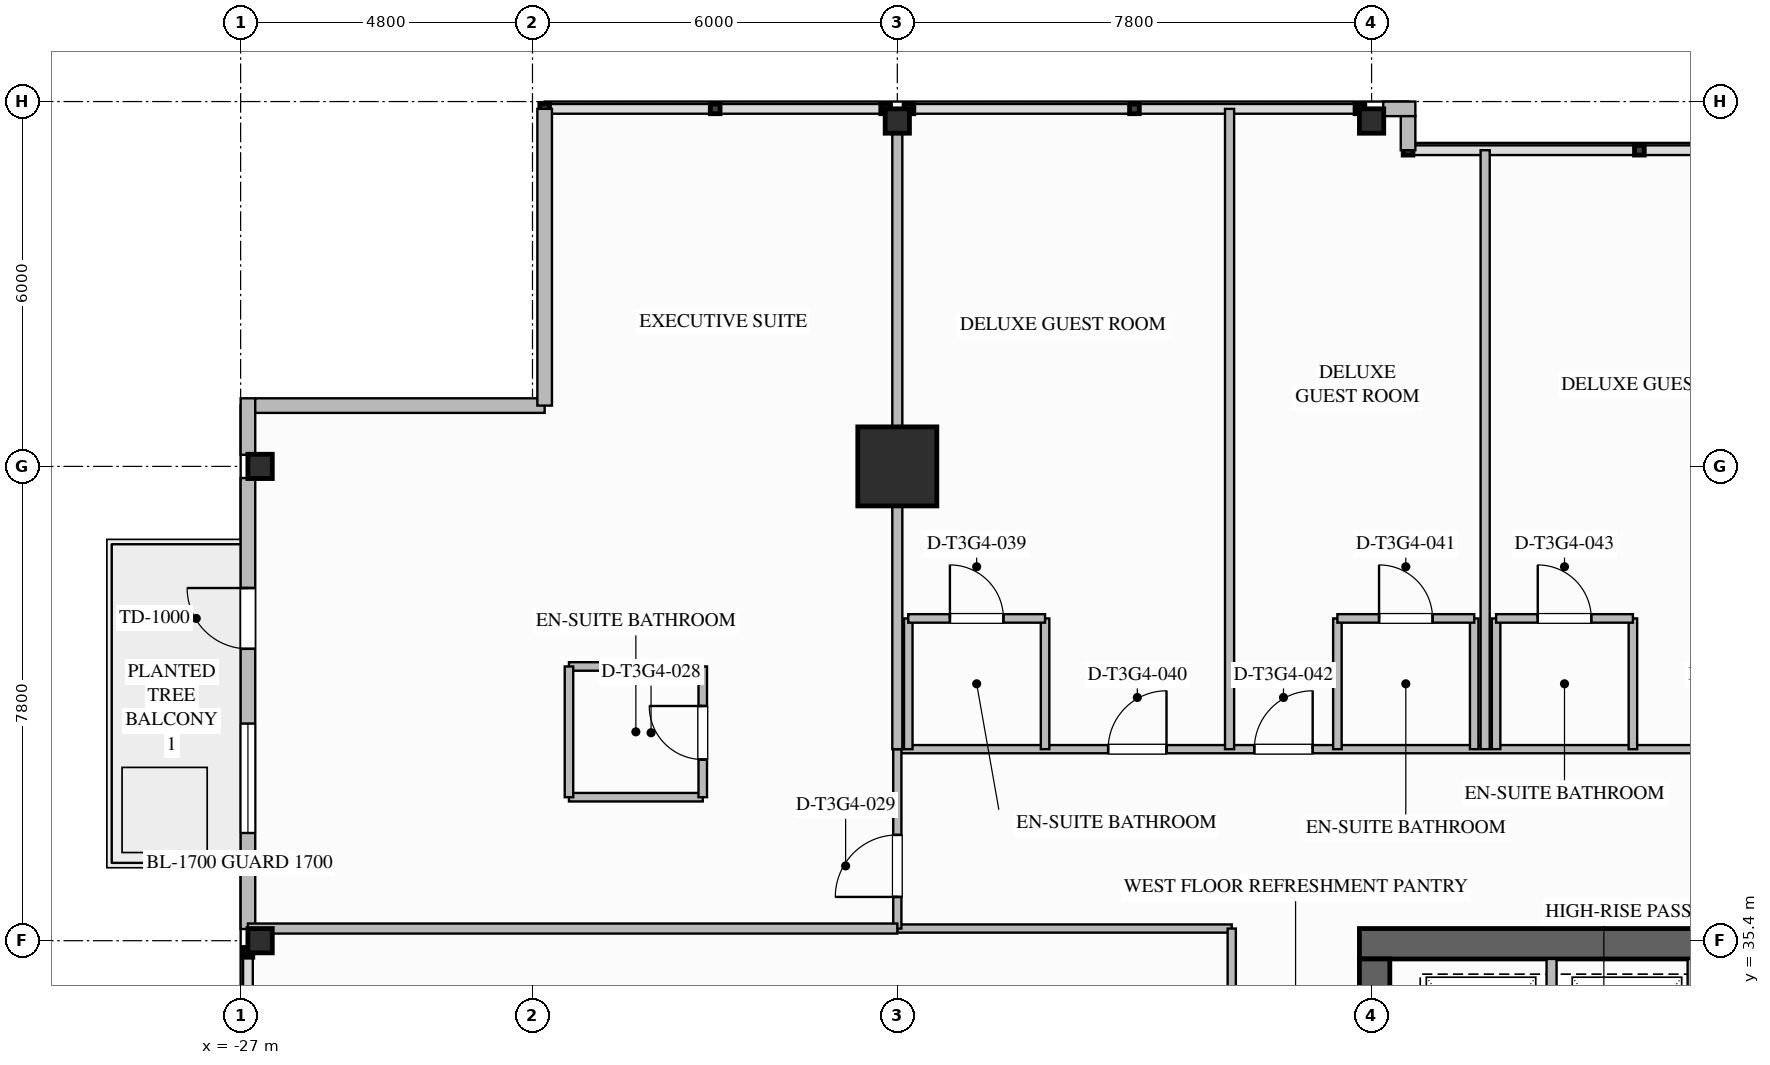
"""IFC4 building model, lengths in metres.
Left out: names, types, materials, properties, quantities, classifications, styles, units other than length and angle.
Written with IfcOpenShell. Run it as: python <this file> out.ifc"""

import sys

from ifc_helpers import new_model, si_unit, direction, frame, frame_2d, origin, origin_2d, place, context, subcontext, project, spatial, rectangle, i_section, extrude, element, fill, save


model = new_model("IFC4")
c1 = context("Model", 3, precision=1e-05, world=origin(), true_north=direction((0.0, 1.0)))
c2 = subcontext(c1, "Body", "Model", "MODEL_VIEW")
j1 = project(units=[si_unit("LENGTHUNIT", "METRE"), si_unit("PLANEANGLEUNIT", "RADIAN")], contexts=[c1])
p1 = place(None, origin())
s1 = spatial("IfcSite", under=j1, at=p1, CompositionType="ELEMENT")
p2 = place(p1, origin())
s2 = spatial("IfcBuilding", under=s1, at=p2, CompositionType="ELEMENT")
p3 = place(p2, frame((0.0, 0.0, 182.35)))
s3 = spatial("IfcBuildingStorey", under=s2, at=p3, CompositionType="ELEMENT", Elevation=182.35)
p4 = place(p3, frame((-8.6, 35.35, 0.0), z_axis=(0.0, 0.0, 1.0), x_axis=(1.0, 0.0, 0.0)))
e1 = element("IfcWall", 1, at=p4, inside=s3, PredefinedType="SHEAR", context=c2, shape_type="SweptSolid", body=[
    extrude(rectangle(XDim=17.2, YDim=0.5, at=frame_2d((8.6, 0.0))), origin(), (0.0, 0.0, 1.0), 3.55),
])
p5 = place(p3, frame((-8.35, 18.9, 0.0), z_axis=(0.0, 0.0, 1.0), x_axis=(0.0, 1.0, 0.0)))
e2 = element("IfcWall", 2, at=p5, inside=s3, PredefinedType="SHEAR", context=c2, shape_type="SweptSolid", body=[
    extrude(rectangle(XDim=16.2, YDim=0.5, at=frame_2d((8.1, 0.0))), origin(), (0.0, 0.0, 1.0), 3.55),
])
p6 = place(p5, frame((12.02, 0.0, 0.0)))
e3 = element("IfcOpeningElement", 3, at=p6, cuts=e2, PredefinedType="OPENING", context=c2, shape_type="SweptSolid", body=[
    extrude(rectangle(XDim=1.08, YDim=2.04, at=frame_2d((0.54, 1.02))), frame((0.0, 0.26, 0.0), z_axis=(0.0, -1.0, 0.0), x_axis=(1.0, 0.0, 0.0)), (0.0, 0.0, 1.0), 0.52),
])
p7 = place(p5, frame((4.5, 0.0, 0.0)))
e4 = element("IfcOpeningElement", 4, at=p7, cuts=e2, PredefinedType="OPENING", context=c2, shape_type="SweptSolid", body=[
    extrude(rectangle(XDim=1.08, YDim=2.04, at=frame_2d((0.54, 1.02))), frame((0.0, 0.26, 0.0), z_axis=(0.0, -1.0, 0.0), x_axis=(1.0, 0.0, 0.0)), (0.0, 0.0, 1.0), 0.52),
])
p8 = place(p3, frame((-16.2, 43.2, 0.0), z_axis=(0.0, 0.0, 1.0), x_axis=(1.0, 0.0, 0.0)))
e5 = element("IfcColumn", 5, at=p8, inside=s3, PredefinedType="COLUMN", context=c2, shape_type="SweptSolid", body=[
    extrude(rectangle(XDim=1.3, YDim=1.3, at=origin_2d()), origin(), (0.0, 0.0, 1.0), 3.55),
])
for number, where, z_axis, x_axis in (
    (6, (-26.68, 35.4, 0.0), (0.0, 0.0, 1.0), (1.0, 0.0, 0.0)),
    (7, (-26.68, 43.2, 0.0), (0.0, 0.0, 1.0), (1.0, 0.0, 0.0)),
    (8, (-16.2, 48.88, 0.0), (0.0, 0.0, 1.0), (0.0, 1.0, 0.0)),
    (9, (-8.4, 48.88, 0.0), (0.0, 0.0, 1.0), (0.0, 1.0, 0.0)),
):
    element("IfcColumn", number, at=place(p3, frame(where, z_axis=z_axis, x_axis=x_axis)), inside=s3, PredefinedType="COLUMN", context=c2, shape_type="SweptSolid", body=[
        extrude(i_section(OverallWidth=0.401, OverallDepth=0.399, WebThickness=0.025, FlangeThickness=0.04, FilletRadius=0.025, at=origin_2d()), origin(), (0.0, 0.0, 1.0), 3.547),
    ])
p9 = place(p3, frame((-26.88, 35.592, 0.0), z_axis=(0.0, 0.0, 1.0), x_axis=(0.0, 1.0, 0.0)))
e10 = element("IfcWall", 10, at=p9, inside=s3, PredefinedType="STANDARD", context=c2, shape_type="SweptSolid", body=[
    extrude(rectangle(XDim=7.417, YDim=0.24, at=frame_2d((3.708, 0.0))), origin(), (0.0, 0.0, 1.0), 2.753),
])
p10 = place(p9, frame((4.608, 0.0, 0.0)))
e11 = element("IfcOpeningElement", 11, at=p10, cuts=e10, PredefinedType="OPENING", context=c2, shape_type="SweptSolid", body=[
    extrude(rectangle(XDim=1.0, YDim=2.2, at=frame_2d((0.5, 1.1))), frame((0.0, 0.13, 0.0), z_axis=(0.0, -1.0, 0.0), x_axis=(1.0, 0.0, 0.0)), (0.0, 0.0, 1.0), 0.26),
])
p11 = place(p9, frame((1.58, 0.0, 0.75)))
e12 = element("IfcOpeningElement", 12, at=p11, cuts=e10, PredefinedType="OPENING", context=c2, shape_type="SweptSolid", body=[
    extrude(rectangle(XDim=1.8, YDim=1.903, at=frame_2d((0.9, 0.952))), frame((0.0, 0.13, 0.0), z_axis=(0.0, -1.0, 0.0), x_axis=(1.0, 0.0, 0.0)), (0.0, 0.0, 1.0), 0.26),
])
p12 = place(p3, frame((-26.88, 43.392, 0.0), z_axis=(0.0, 0.0, 1.0), x_axis=(0.0, 1.0, 0.0)))
e13 = element("IfcWall", 13, at=p12, inside=s3, PredefinedType="STANDARD", context=c2, shape_type="SweptSolid", body=[
    extrude(rectangle(XDim=0.928, YDim=0.24, at=frame_2d((0.464, 0.0))), origin(), (0.0, 0.0, 1.0), 3.29),
])
p13 = place(p3, frame((-8.208, 49.08, 0.0), z_axis=(0.0, 0.0, 1.0), x_axis=(1.0, 0.0, 0.0)))
e14 = element("IfcWall", 14, at=p13, inside=s3, PredefinedType="STANDARD", context=c2, shape_type="SweptSolid", body=[
    extrude(rectangle(XDim=0.528, YDim=0.24, at=frame_2d((0.264, 0.0))), origin(), (0.0, 0.0, 1.0), 3.29),
])
p14 = place(p3, frame((-26.76, 44.2, 0.0), z_axis=(0.0, 0.0, 1.0), x_axis=(1.0, 0.0, 0.0)))
e15 = element("IfcWall", 15, at=p14, inside=s3, PredefinedType="STANDARD", context=c2, shape_type="SweptSolid", body=[
    extrude(rectangle(XDim=4.76, YDim=0.24, at=frame_2d((2.38, 0.0))), origin(), (0.0, 0.0, 1.0), 3.29),
])
p15 = place(p3, frame((-22.0, 44.2, 0.0), z_axis=(0.0, 0.0, 1.0), x_axis=(0.0, 1.0, 0.0)))
e16 = element("IfcWall", 16, at=p15, inside=s3, PredefinedType="STANDARD", context=c2, shape_type="SweptSolid", body=[
    extrude(rectangle(XDim=4.88, YDim=0.24, at=frame_2d((2.44, 0.0))), origin(), (0.0, 0.0, 1.0), 3.29),
])
p16 = place(p3, frame((-7.8, 48.96, 0.0), z_axis=(0.0, 0.0, 1.0), x_axis=(0.0, -1.0, 0.0)))
e17 = element("IfcWall", 17, at=p16, inside=s3, PredefinedType="STANDARD", context=c2, shape_type="SweptSolid", body=[
    extrude(rectangle(XDim=0.56, YDim=0.24, at=frame_2d((0.28, 0.0))), origin(), (0.0, 0.0, 1.0), 3.29),
])
for number, where, z_axis, x_axis in (
    (18, (-5.44, 32.22, 0.0), (0.0, 0.0, 1.0), (0.0, 1.0, 0.0)),
    (19, (-3.12, 32.22, 0.0), (0.0, 0.0, 1.0), (0.0, 1.0, 0.0)),
):
    element("IfcWall", number, at=place(p3, frame(where, z_axis=z_axis, x_axis=x_axis)), inside=s3, PredefinedType="PARTITIONING", context=c2, shape_type="SweptSolid", body=[
        extrude(rectangle(XDim=2.88, YDim=0.165, at=frame_2d((1.44, 0.0))), origin(), (0.0, 0.0, 1.0), 3.29),
    ])
p17 = place(p3, frame((-16.2, 35.6, 0.0), z_axis=(0.0, 0.0, 1.0), x_axis=(1.0, 0.0, 0.0)))
e20 = element("IfcWall", 20, at=p17, inside=s3, PredefinedType="PARTITIONING", context=c2, shape_type="SweptSolid", body=[
    extrude(rectangle(XDim=5.5, YDim=0.135, at=frame_2d((2.75, 0.0))), origin(), (0.0, 0.0, 1.0), 2.667),
])
p18 = place(p3, frame((-16.2, 38.55, 0.0), z_axis=(0.0, 0.0, 1.0), x_axis=(1.0, 0.0, 0.0)))
e21 = element("IfcWall", 21, at=p18, inside=s3, PredefinedType="PARTITIONING", context=c2, shape_type="SweptSolid", body=[
    extrude(rectangle(XDim=24.8, YDim=0.135, at=frame_2d((12.4, 0.0))), origin(), (0.0, 0.0, 1.0), 3.29),
])
p19 = place(p18, frame((3.467, 0.0, 0.0)))
e22 = element("IfcOpeningElement", 22, at=p19, cuts=e21, PredefinedType="OPENING", context=c2, shape_type="SweptSolid", body=[
    extrude(rectangle(XDim=0.96, YDim=2.15, at=frame_2d((0.48, 1.075))), frame((0.0, 0.077, 0.0), z_axis=(0.0, -1.0, 0.0), x_axis=(1.0, 0.0, 0.0)), (0.0, 0.0, 1.0), 0.155),
])
p20 = place(p18, frame((5.871, 0.0, 0.0)))
e23 = element("IfcOpeningElement", 23, at=p20, cuts=e21, PredefinedType="OPENING", context=c2, shape_type="SweptSolid", body=[
    extrude(rectangle(XDim=0.96, YDim=2.15, at=frame_2d((0.48, 1.075))), frame((0.0, 0.077, 0.0), z_axis=(0.0, -1.0, 0.0), x_axis=(1.0, 0.0, 0.0)), (0.0, 0.0, 1.0), 0.155),
])
p21 = place(p18, frame((13.345, 0.0, 0.0)))
e24 = element("IfcOpeningElement", 24, at=p21, cuts=e21, PredefinedType="OPENING", context=c2, shape_type="SweptSolid", body=[
    extrude(rectangle(XDim=0.96, YDim=2.15, at=frame_2d((0.48, 1.075))), frame((0.0, 0.077, 0.0), z_axis=(0.0, -1.0, 0.0), x_axis=(1.0, 0.0, 0.0)), (0.0, 0.0, 1.0), 0.155),
])
p22 = place(p18, frame((15.959, 0.0, 0.0)))
e25 = element("IfcOpeningElement", 25, at=p22, cuts=e21, PredefinedType="OPENING", context=c2, shape_type="SweptSolid", body=[
    extrude(rectangle(XDim=0.96, YDim=2.15, at=frame_2d((0.48, 1.075))), frame((0.0, 0.077, 0.0), z_axis=(0.0, -1.0, 0.0), x_axis=(1.0, 0.0, 0.0)), (0.0, 0.0, 1.0), 0.155),
])
p23 = place(p18, frame((23.013, 0.0, 0.0)))
e26 = element("IfcOpeningElement", 26, at=p23, cuts=e21, PredefinedType="OPENING", context=c2, shape_type="SweptSolid", body=[
    extrude(rectangle(XDim=0.96, YDim=2.15, at=frame_2d((0.48, 1.075))), frame((0.0, 0.077, 0.0), z_axis=(0.0, -1.0, 0.0), x_axis=(1.0, 0.0, 0.0)), (0.0, 0.0, 1.0), 0.155),
])
p24 = place(p3, frame((-10.7, 18.4, 0.0), z_axis=(0.0, 0.0, 1.0), x_axis=(0.0, 1.0, 0.0)))
e27 = element("IfcWall", 27, at=p24, inside=s3, PredefinedType="PARTITIONING", context=c2, shape_type="SweptSolid", body=[
    extrude(rectangle(XDim=17.2, YDim=0.135, at=frame_2d((8.6, 0.0))), origin(), (0.0, 0.0, 1.0), 3.29),
])
p25 = place(p24, frame((6.685, 0.0, 0.0)))
e28 = element("IfcOpeningElement", 28, at=p25, cuts=e27, PredefinedType="OPENING", context=c2, shape_type="SweptSolid", body=[
    extrude(rectangle(XDim=1.26, YDim=2.2, at=frame_2d((0.63, 1.1))), frame((0.0, 0.077, 0.0), z_axis=(0.0, -1.0, 0.0), x_axis=(1.0, 0.0, 0.0)), (0.0, 0.0, 1.0), 0.155),
])
p26 = place(p24, frame((10.59, 0.0, 0.0)))
e29 = element("IfcOpeningElement", 29, at=p26, cuts=e27, PredefinedType="OPENING", context=c2, shape_type="SweptSolid", body=[
    extrude(rectangle(XDim=1.02, YDim=2.15, at=frame_2d((0.51, 1.075))), frame((0.0, 0.077, 0.0), z_axis=(0.0, -1.0, 0.0), x_axis=(1.0, 0.0, 0.0)), (0.0, 0.0, 1.0), 0.155),
])
p27 = place(p3, frame((-16.2, 35.6, 0.0), z_axis=(0.0, 0.0, 1.0), x_axis=(0.0, 1.0, 0.0)))
e30 = element("IfcWall", 30, at=p27, inside=s3, PredefinedType="PARTITIONING", context=c2, shape_type="SweptSolid", body=[
    extrude(rectangle(XDim=2.95, YDim=0.135, at=frame_2d((1.475, 0.0))), origin(), (0.0, 0.0, 1.0), 2.579),
])
p28 = place(p27, frame((0.52, 0.0, 0.0)))
e31 = element("IfcOpeningElement", 31, at=p28, cuts=e30, PredefinedType="OPENING", context=c2, shape_type="SweptSolid", body=[
    extrude(rectangle(XDim=1.02, YDim=2.15, at=frame_2d((0.51, 1.075))), frame((0.0, 0.077, 0.0), z_axis=(0.0, -1.0, 0.0), x_axis=(1.0, 0.0, 0.0)), (0.0, 0.0, 1.0), 0.155),
])
p29 = place(p3, frame((-16.2, 38.55, 0.0), z_axis=(0.0, 0.0, 1.0), x_axis=(0.0, 1.0, 0.0)))
e32 = element("IfcWall", 32, at=p29, inside=s3, PredefinedType="PARTITIONING", context=c2, shape_type="SweptSolid", body=[
    extrude(rectangle(XDim=10.53, YDim=0.165, at=frame_2d((5.265, 0.0))), origin(), (0.0, 0.0, 1.0), 2.579),
])
p30 = place(p3, frame((-26.88, 35.6, 0.0), z_axis=(0.0, 0.0, 1.0), x_axis=(1.0, 0.0, 0.0)))
e33 = element("IfcWall", 33, at=p30, inside=s3, PredefinedType="PARTITIONING", context=c2, shape_type="SweptSolid", body=[
    extrude(rectangle(XDim=10.68, YDim=0.165, at=frame_2d((5.34, 0.0))), origin(), (0.0, 0.0, 1.0), 2.579),
])
for number, where, z_axis, x_axis in (
    (34, (-21.6, 37.76, 0.0), (0.0, 0.0, 1.0), (1.0, 0.0, 0.0)),
    (35, (-21.6, 39.91, 0.0), (0.0, 0.0, 1.0), (1.0, 0.0, 0.0)),
):
    element("IfcWall", number, at=place(p3, frame(where, z_axis=z_axis, x_axis=x_axis)), inside=s3, PredefinedType="PLUMBINGWALL", context=c2, shape_type="SweptSolid", body=[
        extrude(rectangle(XDim=2.2, YDim=0.14, at=frame_2d((1.1, 0.0))), origin(), (0.0, 0.0, 1.0), 3.29),
    ])
p31 = place(p3, frame((-21.6, 37.76, 0.0), z_axis=(0.0, 0.0, 1.0), x_axis=(0.0, 1.0, 0.0)))
e36 = element("IfcWall", 36, at=p31, inside=s3, PredefinedType="PLUMBINGWALL", context=c2, shape_type="SweptSolid", body=[
    extrude(rectangle(XDim=2.15, YDim=0.14, at=frame_2d((1.075, 0.0))), origin(), (0.0, 0.0, 1.0), 3.29),
])
p32 = place(p3, frame((-19.4, 37.76, 0.0), z_axis=(0.0, 0.0, 1.0), x_axis=(0.0, 1.0, 0.0)))
e37 = element("IfcWall", 37, at=p32, inside=s3, PredefinedType="PLUMBINGWALL", context=c2, shape_type="SweptSolid", body=[
    extrude(rectangle(XDim=2.15, YDim=0.14, at=frame_2d((1.075, 0.0))), origin(), (0.0, 0.0, 1.0), 3.29),
])
p33 = place(p32, frame((0.62, 0.0, 0.0)))
e38 = element("IfcOpeningElement", 38, at=p33, cuts=e37, PredefinedType="OPENING", context=c2, shape_type="SweptSolid", body=[
    extrude(rectangle(XDim=0.88, YDim=2.1, at=frame_2d((0.44, 1.05))), frame((0.0, 0.08, 0.0), z_axis=(0.0, -1.0, 0.0), x_axis=(1.0, 0.0, 0.0)), (0.0, 0.0, 1.0), 0.16),
])
p34 = place(p3, frame((-16.02, 38.55, 0.0), z_axis=(0.0, 0.0, 1.0), x_axis=(0.0, 1.0, 0.0)))
e39 = element("IfcWall", 39, at=p34, inside=s3, PredefinedType="PLUMBINGWALL", context=c2, shape_type="SweptSolid", body=[
    extrude(rectangle(XDim=2.15, YDim=0.14, at=frame_2d((1.075, 0.0))), origin(), (0.0, 0.0, 1.0), 2.579),
])
p35 = place(p3, frame((-13.77, 38.55, 0.0), z_axis=(0.0, 0.0, 1.0), x_axis=(0.0, 1.0, 0.0)))
e40 = element("IfcWall", 40, at=p35, inside=s3, PredefinedType="PLUMBINGWALL", context=c2, shape_type="SweptSolid", body=[
    extrude(rectangle(XDim=2.15, YDim=0.14, at=frame_2d((1.075, 0.0))), origin(), (0.0, 0.0, 1.0), 3.29),
])
p36 = place(p3, frame((-16.02, 40.7, 0.0), z_axis=(0.0, 0.0, 1.0), x_axis=(1.0, 0.0, 0.0)))
e41 = element("IfcWall", 41, at=p36, inside=s3, PredefinedType="PLUMBINGWALL", context=c2, shape_type="SweptSolid", body=[
    extrude(rectangle(XDim=2.25, YDim=0.14, at=frame_2d((1.125, 0.0))), origin(), (0.0, 0.0, 1.0), 3.29),
])
p37 = place(p36, frame((0.685, 0.0, 0.0)))
e42 = element("IfcOpeningElement", 42, at=p37, cuts=e41, PredefinedType="OPENING", context=c2, shape_type="SweptSolid", body=[
    extrude(rectangle(XDim=0.88, YDim=2.1, at=frame_2d((0.44, 1.05))), frame((0.0, 0.08, 0.0), z_axis=(0.0, -1.0, 0.0), x_axis=(1.0, 0.0, 0.0)), (0.0, 0.0, 1.0), 0.16),
])
p38 = place(p3, frame((-10.736, 38.55, 0.0), z_axis=(0.0, 0.0, 1.0), x_axis=(0.0, 1.0, 0.0)))
e43 = element("IfcWall", 43, at=p38, inside=s3, PredefinedType="PARTITIONING", context=c2, shape_type="SweptSolid", body=[
    extrude(rectangle(XDim=10.53, YDim=0.15, at=frame_2d((5.265, 0.0))), origin(), (0.0, 0.0, 1.0), 3.29),
])
for number, where, z_axis, x_axis in (
    (44, (-8.962, 38.55, 0.0), (0.0, 0.0, 1.0), (0.0, 1.0, 0.0)),
    (45, (-6.712, 38.55, 0.0), (0.0, 0.0, 1.0), (0.0, 1.0, 0.0)),
):
    element("IfcWall", number, at=place(p3, frame(where, z_axis=z_axis, x_axis=x_axis)), inside=s3, PredefinedType="PLUMBINGWALL", context=c2, shape_type="SweptSolid", body=[
        extrude(rectangle(XDim=2.15, YDim=0.14, at=frame_2d((1.075, 0.0))), origin(), (0.0, 0.0, 1.0), 3.29),
    ])
p39 = place(p3, frame((-8.962, 40.7, 0.0), z_axis=(0.0, 0.0, 1.0), x_axis=(1.0, 0.0, 0.0)))
e46 = element("IfcWall", 46, at=p39, inside=s3, PredefinedType="PLUMBINGWALL", context=c2, shape_type="SweptSolid", body=[
    extrude(rectangle(XDim=2.25, YDim=0.14, at=frame_2d((1.125, 0.0))), origin(), (0.0, 0.0, 1.0), 3.29),
])
p40 = place(p39, frame((0.685, 0.0, 0.0)))
e47 = element("IfcOpeningElement", 47, at=p40, cuts=e46, PredefinedType="OPENING", context=c2, shape_type="SweptSolid", body=[
    extrude(rectangle(XDim=0.88, YDim=2.1, at=frame_2d((0.44, 1.05))), frame((0.0, 0.08, 0.0), z_axis=(0.0, -1.0, 0.0), x_axis=(1.0, 0.0, 0.0)), (0.0, 0.0, 1.0), 0.16),
])
p41 = place(p3, frame((-6.532, 38.55, 0.0), z_axis=(0.0, 0.0, 1.0), x_axis=(0.0, 1.0, 0.0)))
e48 = element("IfcWall", 48, at=p41, inside=s3, PredefinedType="PARTITIONING", context=c2, shape_type="SweptSolid", body=[
    extrude(rectangle(XDim=9.85, YDim=0.15, at=frame_2d((4.925, 0.0))), origin(), (0.0, 0.0, 1.0), 3.29),
])
for number, where, z_axis, x_axis in (
    (49, (-6.352, 38.55, 0.0), (0.0, 0.0, 1.0), (0.0, 1.0, 0.0)),
    (50, (-4.102, 38.55, 0.0), (0.0, 0.0, 1.0), (0.0, 1.0, 0.0)),
):
    element("IfcWall", number, at=place(p3, frame(where, z_axis=z_axis, x_axis=x_axis)), inside=s3, PredefinedType="PLUMBINGWALL", context=c2, shape_type="SweptSolid", body=[
        extrude(rectangle(XDim=2.15, YDim=0.14, at=frame_2d((1.075, 0.0))), origin(), (0.0, 0.0, 1.0), 3.29),
    ])
p42 = place(p3, frame((-6.352, 40.7, 0.0), z_axis=(0.0, 0.0, 1.0), x_axis=(1.0, 0.0, 0.0)))
e51 = element("IfcWall", 51, at=p42, inside=s3, PredefinedType="PLUMBINGWALL", context=c2, shape_type="SweptSolid", body=[
    extrude(rectangle(XDim=2.25, YDim=0.14, at=frame_2d((1.125, 0.0))), origin(), (0.0, 0.0, 1.0), 3.29),
])
p43 = place(p42, frame((0.685, 0.0, 0.0)))
e52 = element("IfcOpeningElement", 52, at=p43, cuts=e51, PredefinedType="OPENING", context=c2, shape_type="SweptSolid", body=[
    extrude(rectangle(XDim=0.88, YDim=2.1, at=frame_2d((0.44, 1.05))), frame((0.0, 0.08, 0.0), z_axis=(0.0, -1.0, 0.0), x_axis=(1.0, 0.0, 0.0)), (0.0, 0.0, 1.0), 0.16),
])
p44 = place(p10, origin())
e53 = element("IfcDoor", 53, at=p44, inside=s3, OperationType="SINGLE_SWING_RIGHT", PredefinedType="DOOR", context=c2, shape_type="SweptSolid", body=[
    extrude(rectangle(XDim=1.0, YDim=2.2, at=frame_2d((0.5, 1.1))), frame((0.0, 0.025, 0.0), z_axis=(0.0, -1.0, 0.0), x_axis=(1.0, 0.0, 0.0)), (0.0, 0.0, 1.0), 0.05),
])
fill(e11, e53)
p45 = place(p11, origin())
e54 = element("IfcWindow", 54, at=p45, inside=s3, PartitioningType="SINGLE_PANEL", PredefinedType="WINDOW", context=c2, shape_type="SweptSolid", body=[
    extrude(rectangle(XDim=1.8, YDim=1.903, at=frame_2d((0.9, 0.952))), frame((0.0, 0.03, 0.0), z_axis=(0.0, -1.0, 0.0), x_axis=(1.0, 0.0, 0.0)), (0.0, 0.0, 1.0), 0.06),
])
fill(e12, e54)
p46 = place(p33, origin())
e55 = element("IfcDoor", 55, at=p46, inside=s3, OperationType="SINGLE_SWING_RIGHT", PredefinedType="DOOR", context=c2, shape_type="SweptSolid", body=[
    extrude(rectangle(XDim=0.88, YDim=2.1, at=frame_2d((0.44, 1.05))), frame((0.0, 0.025, 0.0), z_axis=(0.0, -1.0, 0.0), x_axis=(1.0, 0.0, 0.0)), (0.0, 0.0, 1.0), 0.05),
])
fill(e38, e55)
p47 = place(p28, origin())
e56 = element("IfcDoor", 56, at=p47, inside=s3, OperationType="SINGLE_SWING_LEFT", PredefinedType="DOOR", context=c2, shape_type="SweptSolid", body=[
    extrude(rectangle(XDim=1.02, YDim=2.15, at=frame_2d((0.51, 1.075))), frame((0.0, 0.025, 0.0), z_axis=(0.0, -1.0, 0.0), x_axis=(1.0, 0.0, 0.0)), (0.0, 0.0, 1.0), 0.05),
])
fill(e31, e56)
p48 = place(p37, origin())
e57 = element("IfcDoor", 57, at=p48, inside=s3, OperationType="SINGLE_SWING_LEFT", PredefinedType="DOOR", context=c2, shape_type="SweptSolid", body=[
    extrude(rectangle(XDim=0.88, YDim=2.1, at=frame_2d((0.44, 1.05))), frame((0.0, 0.025, 0.0), z_axis=(0.0, -1.0, 0.0), x_axis=(1.0, 0.0, 0.0)), (0.0, 0.0, 1.0), 0.05),
])
fill(e42, e57)
p49 = place(p19, origin())
e58 = element("IfcDoor", 58, at=p49, inside=s3, OperationType="SINGLE_SWING_RIGHT", PredefinedType="DOOR", context=c2, shape_type="SweptSolid", body=[
    extrude(rectangle(XDim=0.96, YDim=2.15, at=frame_2d((0.48, 1.075))), frame((0.0, 0.025, 0.0), z_axis=(0.0, -1.0, 0.0), x_axis=(1.0, 0.0, 0.0)), (0.0, 0.0, 1.0), 0.05),
])
fill(e22, e58)
p50 = place(p40, origin())
e59 = element("IfcDoor", 59, at=p50, inside=s3, OperationType="SINGLE_SWING_LEFT", PredefinedType="DOOR", context=c2, shape_type="SweptSolid", body=[
    extrude(rectangle(XDim=0.88, YDim=2.1, at=frame_2d((0.44, 1.05))), frame((0.0, 0.025, 0.0), z_axis=(0.0, -1.0, 0.0), x_axis=(1.0, 0.0, 0.0)), (0.0, 0.0, 1.0), 0.05),
])
fill(e47, e59)
p51 = place(p20, origin())
e60 = element("IfcDoor", 60, at=p51, inside=s3, OperationType="SINGLE_SWING_RIGHT", PredefinedType="DOOR", context=c2, shape_type="SweptSolid", body=[
    extrude(rectangle(XDim=0.96, YDim=2.15, at=frame_2d((0.48, 1.075))), frame((0.0, 0.025, 0.0), z_axis=(0.0, -1.0, 0.0), x_axis=(1.0, 0.0, 0.0)), (0.0, 0.0, 1.0), 0.05),
])
fill(e23, e60)
p52 = place(p43, origin())
e61 = element("IfcDoor", 61, at=p52, inside=s3, OperationType="SINGLE_SWING_LEFT", PredefinedType="DOOR", context=c2, shape_type="SweptSolid", body=[
    extrude(rectangle(XDim=0.88, YDim=2.1, at=frame_2d((0.44, 1.05))), frame((0.0, 0.025, 0.0), z_axis=(0.0, -1.0, 0.0), x_axis=(1.0, 0.0, 0.0)), (0.0, 0.0, 1.0), 0.05),
])
fill(e52, e61)
save(model, sys.argv[1])
